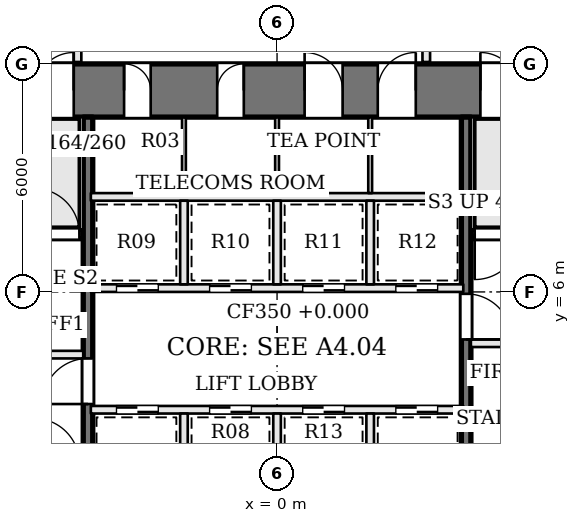
"""IFC4 building model, lengths in metres.
Left out: names, types, materials, properties, quantities, classifications, styles, units other than length and angle.
Written with IfcOpenShell. Run it as: python <this file> out.ifc"""

import sys

from ifc_helpers import new_model, si_unit, direction, frame, frame_2d, origin, place, context, subcontext, project, spatial, rectangle, extrude, element, fill, save


model = new_model("IFC4")
c1 = context("Model", 3, precision=1e-05, world=origin(), true_north=direction((0.0, 1.0)))
c2 = subcontext(c1, "Body", "Model", "MODEL_VIEW")
j1 = project(units=[si_unit("LENGTHUNIT", "METRE"), si_unit("PLANEANGLEUNIT", "RADIAN")], contexts=[c1])
p1 = place(None, origin())
s1 = spatial("IfcSite", under=j1, at=p1, CompositionType="ELEMENT")
p2 = place(p1, origin())
s2 = spatial("IfcBuilding", under=s1, at=p2, CompositionType="ELEMENT")
p3 = place(p2, origin())
s3 = spatial("IfcBuildingStorey", under=s2, at=p3, CompositionType="ELEMENT", Elevation=0.0)
p4 = place(p3, frame((-13.0, 11.3, 0.0), z_axis=(0.0, 0.0, 1.0), x_axis=(1.0, 0.0, 0.0)))
e1 = element("IfcWall", 1, at=p4, inside=s3, PredefinedType="SHEAR", context=c2, shape_type="SweptSolid", body=[
    extrude(rectangle(XDim=26.0, YDim=1.4, at=frame_2d((13.0, 0.0))), origin(), (0.0, 0.0, 1.0), 7.2),
])
p5 = place(p4, frame((8.975, 0.0, 0.0)))
e2 = element("IfcOpeningElement", 2, at=p5, cuts=e1, PredefinedType="OPENING", context=c2, shape_type="SweptSolid", body=[
    extrude(rectangle(XDim=0.7, YDim=2.1, at=frame_2d((0.35, 1.05))), frame((0.0, 0.71, 0.0), z_axis=(0.0, -1.0, 0.0), x_axis=(1.0, 0.0, 0.0)), (0.0, 0.0, 1.0), 1.42),
])
p6 = place(p4, frame((11.425, 0.0, 0.0)))
e3 = element("IfcOpeningElement", 3, at=p6, cuts=e1, PredefinedType="OPENING", context=c2, shape_type="SweptSolid", body=[
    extrude(rectangle(XDim=0.7, YDim=2.1, at=frame_2d((0.35, 1.05))), frame((0.0, 0.71, 0.0), z_axis=(0.0, -1.0, 0.0), x_axis=(1.0, 0.0, 0.0)), (0.0, 0.0, 1.0), 1.42),
])
p7 = place(p4, frame((13.725, 0.0, 0.0)))
e4 = element("IfcOpeningElement", 4, at=p7, cuts=e1, PredefinedType="OPENING", context=c2, shape_type="SweptSolid", body=[
    extrude(rectangle(XDim=1.0, YDim=2.1, at=frame_2d((0.5, 1.05))), frame((0.0, 0.71, 0.0), z_axis=(0.0, -1.0, 0.0), x_axis=(1.0, 0.0, 0.0)), (0.0, 0.0, 1.0), 1.42),
])
p8 = place(p4, frame((15.65, 0.0, 0.0)))
e5 = element("IfcOpeningElement", 5, at=p8, cuts=e1, PredefinedType="OPENING", context=c2, shape_type="SweptSolid", body=[
    extrude(rectangle(XDim=1.0, YDim=2.1, at=frame_2d((0.5, 1.05))), frame((0.0, 0.71, 0.0), z_axis=(0.0, -1.0, 0.0), x_axis=(1.0, 0.0, 0.0)), (0.0, 0.0, 1.0), 1.42),
])
p9 = place(p4, frame((6.65, 0.0, 0.0)))
e6 = element("IfcOpeningElement", 6, at=p9, cuts=e1, PredefinedType="OPENING", context=c2, shape_type="SweptSolid", body=[
    extrude(rectangle(XDim=1.0, YDim=2.1, at=frame_2d((0.5, 1.05))), frame((0.0, 0.71, 0.0), z_axis=(0.0, -1.0, 0.0), x_axis=(1.0, 0.0, 0.0)), (0.0, 0.0, 1.0), 1.42),
])
p10 = place(p4, frame((18.35, 0.0, 0.0)))
e7 = element("IfcOpeningElement", 7, at=p10, cuts=e1, PredefinedType="OPENING", context=c2, shape_type="SweptSolid", body=[
    extrude(rectangle(XDim=1.0, YDim=2.1, at=frame_2d((0.5, 1.05))), frame((0.0, 0.71, 0.0), z_axis=(0.0, -1.0, 0.0), x_axis=(1.0, 0.0, 0.0)), (0.0, 0.0, 1.0), 1.42),
])
p11 = place(p3, frame((11.6, 7.525, 0.0), z_axis=(0.0, 0.0, 1.0), x_axis=(-1.0, 0.0, 0.0)))
e8 = element("IfcWall", 8, at=p11, inside=s3, PredefinedType="SOLIDWALL", context=c2, shape_type="SweptSolid", body=[
    extrude(rectangle(XDim=6.5, YDim=0.25, at=frame_2d((3.25, 0.0))), origin(), (0.0, 0.0, 1.0), 6.95),
])
p12 = place(p11, frame((5.2, 0.0, 0.0)))
e9 = element("IfcOpeningElement", 9, at=p12, cuts=e8, PredefinedType="OPENING", context=c2, shape_type="SweptSolid", body=[
    extrude(rectangle(XDim=1.2, YDim=2.1, at=frame_2d((0.6, 1.05))), frame((0.0, 0.135, 0.0), z_axis=(0.0, -1.0, 0.0), x_axis=(1.0, 0.0, 0.0)), (0.0, 0.0, 1.0), 0.27),
])
p13 = place(p3, frame((-11.6, 4.35, 0.0), z_axis=(0.0, 0.0, 1.0), x_axis=(1.0, 0.0, 0.0)))
e10 = element("IfcWall", 10, at=p13, inside=s3, PredefinedType="SOLIDWALL", context=c2, shape_type="SweptSolid", body=[
    extrude(rectangle(XDim=6.5, YDim=0.2, at=frame_2d((3.25, 0.0))), origin(), (0.0, 0.0, 1.0), 6.95),
])
p14 = place(p13, frame((3.8, 0.0, 0.0)))
e11 = element("IfcOpeningElement", 11, at=p14, cuts=e10, PredefinedType="OPENING", context=c2, shape_type="SweptSolid", body=[
    extrude(rectangle(XDim=1.2, YDim=2.1, at=frame_2d((0.6, 1.05))), frame((0.0, 0.11, 0.0), z_axis=(0.0, -1.0, 0.0), x_axis=(1.0, 0.0, 0.0)), (0.0, 0.0, 1.0), 0.22),
])
p15 = place(p13, frame((0.5, 0.0, 0.0)))
e12 = element("IfcOpeningElement", 12, at=p15, cuts=e10, PredefinedType="OPENING", context=c2, shape_type="SweptSolid", body=[
    extrude(rectangle(XDim=1.2, YDim=2.1, at=frame_2d((0.6, 1.05))), frame((0.0, 0.11, 0.0), z_axis=(0.0, -1.0, 0.0), x_axis=(1.0, 0.0, 0.0)), (0.0, 0.0, 1.0), 0.22),
])
p16 = place(p3, frame((11.6, 4.65, 0.0), z_axis=(0.0, 0.0, 1.0), x_axis=(-1.0, 0.0, 0.0)))
e13 = element("IfcWall", 13, at=p16, inside=s3, PredefinedType="SOLIDWALL", context=c2, shape_type="SweptSolid", body=[
    extrude(rectangle(XDim=6.5, YDim=0.2, at=frame_2d((3.25, 0.0))), origin(), (0.0, 0.0, 1.0), 6.95),
])
p17 = place(p16, frame((3.8, 0.0, 0.0)))
e14 = element("IfcOpeningElement", 14, at=p17, cuts=e13, PredefinedType="OPENING", context=c2, shape_type="SweptSolid", body=[
    extrude(rectangle(XDim=1.2, YDim=2.1, at=frame_2d((0.6, 1.05))), frame((0.0, 0.11, 0.0), z_axis=(0.0, -1.0, 0.0), x_axis=(1.0, 0.0, 0.0)), (0.0, 0.0, 1.0), 0.22),
])
p18 = place(p16, frame((0.5, 0.0, 0.0)))
e15 = element("IfcOpeningElement", 15, at=p18, cuts=e13, PredefinedType="OPENING", context=c2, shape_type="SweptSolid", body=[
    extrude(rectangle(XDim=1.2, YDim=2.1, at=frame_2d((0.6, 1.05))), frame((0.0, 0.11, 0.0), z_axis=(0.0, -1.0, 0.0), x_axis=(1.0, 0.0, 0.0)), (0.0, 0.0, 1.0), 0.22),
])
p19 = place(p3, frame((-11.6, 7.525, 0.0), z_axis=(0.0, 0.0, 1.0), x_axis=(1.0, 0.0, 0.0)))
e16 = element("IfcWall", 16, at=p19, inside=s3, PredefinedType="SOLIDWALL", context=c2, shape_type="SweptSolid", body=[
    extrude(rectangle(XDim=6.5, YDim=0.25, at=frame_2d((3.25, 0.0))), origin(), (0.0, 0.0, 1.0), 6.95),
])
p20 = place(p19, frame((5.2, 0.0, 0.0)))
e17 = element("IfcOpeningElement", 17, at=p20, cuts=e16, PredefinedType="OPENING", context=c2, shape_type="SweptSolid", body=[
    extrude(rectangle(XDim=1.2, YDim=2.1, at=frame_2d((0.6, 1.05))), frame((0.0, 0.135, 0.0), z_axis=(0.0, -1.0, 0.0), x_axis=(1.0, 0.0, 0.0)), (0.0, 0.0, 1.0), 0.27),
])
p21 = place(p3, frame((-4.975, -1.6, 0.0), z_axis=(0.0, 0.0, 1.0), x_axis=(0.0, 1.0, 0.0)))
e18 = element("IfcWall", 18, at=p21, inside=s3, PredefinedType="SOLIDWALL", context=c2, shape_type="SweptSolid", body=[
    extrude(rectangle(XDim=12.2, YDim=0.25, at=frame_2d((6.1, 0.0))), origin(), (0.0, 0.0, 1.0), 6.95),
])
p22 = place(p21, frame((4.65, 0.0, 0.0)))
e19 = element("IfcOpeningElement", 19, at=p22, cuts=e18, PredefinedType="OPENING", context=c2, shape_type="SweptSolid", body=[
    extrude(rectangle(XDim=1.2, YDim=2.1, at=frame_2d((0.6, 1.05))), frame((0.0, 0.135, 0.0), z_axis=(0.0, -1.0, 0.0), x_axis=(1.0, 0.0, 0.0)), (0.0, 0.0, 1.0), 0.27),
])
p23 = place(p3, frame((4.975, 10.6, 0.0), z_axis=(0.0, 0.0, 1.0), x_axis=(0.0, -1.0, 0.0)))
e20 = element("IfcWall", 20, at=p23, inside=s3, PredefinedType="SOLIDWALL", context=c2, shape_type="SweptSolid", body=[
    extrude(rectangle(XDim=12.2, YDim=0.25, at=frame_2d((6.1, 0.0))), origin(), (0.0, 0.0, 1.0), 6.95),
])
p24 = place(p23, frame((4.65, 0.0, 0.0)))
e21 = element("IfcOpeningElement", 21, at=p24, cuts=e20, PredefinedType="OPENING", context=c2, shape_type="SweptSolid", body=[
    extrude(rectangle(XDim=1.2, YDim=2.1, at=frame_2d((0.6, 1.05))), frame((0.0, 0.135, 0.0), z_axis=(0.0, -1.0, 0.0), x_axis=(1.0, 0.0, 0.0)), (0.0, 0.0, 1.0), 0.27),
])
p25 = place(p3, frame((-4.9, 2.9, 0.0), z_axis=(0.0, 0.0, 1.0), x_axis=(1.0, 0.0, 0.0)))
e22 = element("IfcWall", 22, at=p25, inside=s3, PredefinedType="SOLIDWALL", context=c2, shape_type="SweptSolid", body=[
    extrude(rectangle(XDim=9.8, YDim=0.2, at=frame_2d((4.9, 0.0))), origin(), (0.0, 0.0, 1.0), 6.95),
])
p26 = place(p25, frame((0.675, 0.0, 0.0)))
e23 = element("IfcOpeningElement", 23, at=p26, cuts=e22, PredefinedType="OPENING", context=c2, shape_type="SweptSolid", body=[
    extrude(rectangle(XDim=1.1, YDim=2.1, at=frame_2d((0.55, 1.05))), frame((0.0, 0.11, 0.0), z_axis=(0.0, -1.0, 0.0), x_axis=(1.0, 0.0, 0.0)), (0.0, 0.0, 1.0), 0.22),
])
p27 = place(p25, frame((3.125, 0.0, 0.0)))
e24 = element("IfcOpeningElement", 24, at=p27, cuts=e22, PredefinedType="OPENING", context=c2, shape_type="SweptSolid", body=[
    extrude(rectangle(XDim=1.1, YDim=2.1, at=frame_2d((0.55, 1.05))), frame((0.0, 0.11, 0.0), z_axis=(0.0, -1.0, 0.0), x_axis=(1.0, 0.0, 0.0)), (0.0, 0.0, 1.0), 0.22),
])
p28 = place(p25, frame((5.575, 0.0, 0.0)))
e25 = element("IfcOpeningElement", 25, at=p28, cuts=e22, PredefinedType="OPENING", context=c2, shape_type="SweptSolid", body=[
    extrude(rectangle(XDim=1.1, YDim=2.1, at=frame_2d((0.55, 1.05))), frame((0.0, 0.11, 0.0), z_axis=(0.0, -1.0, 0.0), x_axis=(1.0, 0.0, 0.0)), (0.0, 0.0, 1.0), 0.22),
])
p29 = place(p25, frame((8.025, 0.0, 0.0)))
e26 = element("IfcOpeningElement", 26, at=p29, cuts=e22, PredefinedType="OPENING", context=c2, shape_type="SweptSolid", body=[
    extrude(rectangle(XDim=1.1, YDim=2.1, at=frame_2d((0.55, 1.05))), frame((0.0, 0.11, 0.0), z_axis=(0.0, -1.0, 0.0), x_axis=(1.0, 0.0, 0.0)), (0.0, 0.0, 1.0), 0.22),
])
p30 = place(p3, frame((-4.9, 6.1, 0.0), z_axis=(0.0, 0.0, 1.0), x_axis=(1.0, 0.0, 0.0)))
e27 = element("IfcWall", 27, at=p30, inside=s3, PredefinedType="SOLIDWALL", context=c2, shape_type="SweptSolid", body=[
    extrude(rectangle(XDim=9.8, YDim=0.2, at=frame_2d((4.9, 0.0))), origin(), (0.0, 0.0, 1.0), 6.95),
])
p31 = place(p30, frame((0.675, 0.0, 0.0)))
e28 = element("IfcOpeningElement", 28, at=p31, cuts=e27, PredefinedType="OPENING", context=c2, shape_type="SweptSolid", body=[
    extrude(rectangle(XDim=1.1, YDim=2.1, at=frame_2d((0.55, 1.05))), frame((0.0, 0.11, 0.0), z_axis=(0.0, -1.0, 0.0), x_axis=(1.0, 0.0, 0.0)), (0.0, 0.0, 1.0), 0.22),
])
p32 = place(p30, frame((3.125, 0.0, 0.0)))
e29 = element("IfcOpeningElement", 29, at=p32, cuts=e27, PredefinedType="OPENING", context=c2, shape_type="SweptSolid", body=[
    extrude(rectangle(XDim=1.1, YDim=2.1, at=frame_2d((0.55, 1.05))), frame((0.0, 0.11, 0.0), z_axis=(0.0, -1.0, 0.0), x_axis=(1.0, 0.0, 0.0)), (0.0, 0.0, 1.0), 0.22),
])
p33 = place(p30, frame((5.575, 0.0, 0.0)))
e30 = element("IfcOpeningElement", 30, at=p33, cuts=e27, PredefinedType="OPENING", context=c2, shape_type="SweptSolid", body=[
    extrude(rectangle(XDim=1.1, YDim=2.1, at=frame_2d((0.55, 1.05))), frame((0.0, 0.11, 0.0), z_axis=(0.0, -1.0, 0.0), x_axis=(1.0, 0.0, 0.0)), (0.0, 0.0, 1.0), 0.22),
])
p34 = place(p30, frame((8.025, 0.0, 0.0)))
e31 = element("IfcOpeningElement", 31, at=p34, cuts=e27, PredefinedType="OPENING", context=c2, shape_type="SweptSolid", body=[
    extrude(rectangle(XDim=1.1, YDim=2.1, at=frame_2d((0.55, 1.05))), frame((0.0, 0.11, 0.0), z_axis=(0.0, -1.0, 0.0), x_axis=(1.0, 0.0, 0.0)), (0.0, 0.0, 1.0), 0.22),
])
p35 = place(p3, frame((-4.9, 8.5, 0.0), z_axis=(0.0, 0.0, 1.0), x_axis=(1.0, 0.0, 0.0)))
e32 = element("IfcWall", 32, at=p35, inside=s3, PredefinedType="SOLIDWALL", context=c2, shape_type="SweptSolid", body=[
    extrude(rectangle(XDim=9.8, YDim=0.2, at=frame_2d((4.9, 0.0))), origin(), (0.0, 0.0, 1.0), 6.95),
])
for number, where, z_axis, x_axis in (
    (33, (-2.45, 0.6, 0.0), (0.0, 0.0, 1.0), (0.0, 1.0, 0.0)),
    (34, (0.0, 0.6, 0.0), (0.0, 0.0, 1.0), (0.0, 1.0, 0.0)),
    (35, (2.45, 0.6, 0.0), (0.0, 0.0, 1.0), (0.0, 1.0, 0.0)),
    (36, (-2.45, 6.2, 0.0), (0.0, 0.0, 1.0), (0.0, 1.0, 0.0)),
    (37, (0.0, 6.2, 0.0), (0.0, 0.0, 1.0), (0.0, 1.0, 0.0)),
    (38, (2.45, 6.2, 0.0), (0.0, 0.0, 1.0), (0.0, 1.0, 0.0)),
):
    element("IfcWall", number, at=place(p3, frame(where, z_axis=z_axis, x_axis=x_axis)), inside=s3, PredefinedType="SOLIDWALL", context=c2, shape_type="SweptSolid", body=[
        extrude(rectangle(XDim=2.2, YDim=0.2, at=frame_2d((1.1, 0.0))), origin(), (0.0, 0.0, 1.0), 6.95),
    ])
for number, where, z_axis, x_axis in (
    (39, (-2.45, 8.6, 0.0), (0.0, 0.0, 1.0), (0.0, 1.0, 0.0)),
    (40, (0.0, 8.6, 0.0), (0.0, 0.0, 1.0), (0.0, 1.0, 0.0)),
    (41, (2.45, 8.6, 0.0), (0.0, 0.0, 1.0), (0.0, 1.0, 0.0)),
):
    element("IfcWall", number, at=place(p3, frame(where, z_axis=z_axis, x_axis=x_axis)), inside=s3, PredefinedType="PARTITIONING", context=c2, shape_type="SweptSolid", body=[
        extrude(rectangle(XDim=2.0, YDim=0.1, at=frame_2d((1.0, 0.0))), origin(), (0.0, 0.0, 1.0), 6.95),
    ])
p36 = place(p3, frame((-5.25, 22.21, 0.0), z_axis=(0.0, 0.0, 1.0), x_axis=(0.0, -1.0, 0.0)))
e42 = element("IfcWall", 42, at=p36, inside=s3, PredefinedType="PARTITIONING", context=c2, shape_type="SweptSolid", body=[
    extrude(rectangle(XDim=10.16, YDim=0.2, at=frame_2d((5.08, 0.0))), origin(), (0.0, 0.0, 1.0), 6.23),
])
p37 = place(p36, frame((8.21, 0.0, 0.0)))
e43 = element("IfcOpeningElement", 43, at=p37, cuts=e42, PredefinedType="OPENING", context=c2, shape_type="SweptSolid", body=[
    extrude(rectangle(XDim=1.0, YDim=2.1, at=frame_2d((0.5, 1.05))), frame((0.0, 0.11, 0.0), z_axis=(0.0, -1.0, 0.0), x_axis=(1.0, 0.0, 0.0)), (0.0, 0.0, 1.0), 0.22),
])
p38 = place(p3, frame((3.926, 12.05, 0.0), z_axis=(0.0, 0.0, 1.0), x_axis=(0.0, 1.0, 0.0)))
e44 = element("IfcWall", 44, at=p38, inside=s3, PredefinedType="PARTITIONING", context=c2, shape_type="SweptSolid", body=[
    extrude(rectangle(XDim=10.252, YDim=0.2, at=frame_2d((5.126, 0.0))), origin(), (0.0, 0.0, 1.0), 6.23),
])
p39 = place(p38, frame((0.95, 0.0, 0.0)))
e45 = element("IfcOpeningElement", 45, at=p39, cuts=e44, PredefinedType="OPENING", context=c2, shape_type="SweptSolid", body=[
    extrude(rectangle(XDim=1.0, YDim=2.1, at=frame_2d((0.5, 1.05))), frame((0.0, 0.11, 0.0), z_axis=(0.0, -1.0, 0.0), x_axis=(1.0, 0.0, 0.0)), (0.0, 0.0, 1.0), 0.22),
])
p40 = place(p22, origin())
e46 = element("IfcDoor", 46, at=p40, inside=s3, OperationType="SINGLE_SWING_LEFT", PredefinedType="DOOR", context=c2, shape_type="SweptSolid", body=[
    extrude(rectangle(XDim=1.2, YDim=2.1, at=frame_2d((0.6, 1.05))), frame((0.0, 0.025, 0.0), z_axis=(0.0, -1.0, 0.0), x_axis=(1.0, 0.0, 0.0)), (0.0, 0.0, 1.0), 0.05),
])
fill(e19, e46)
p41 = place(p24, origin())
e47 = element("IfcDoor", 47, at=p41, inside=s3, OperationType="SINGLE_SWING_RIGHT", PredefinedType="DOOR", context=c2, shape_type="SweptSolid", body=[
    extrude(rectangle(XDim=1.2, YDim=2.1, at=frame_2d((0.6, 1.05))), frame((0.0, 0.025, 0.0), z_axis=(0.0, -1.0, 0.0), x_axis=(1.0, 0.0, 0.0)), (0.0, 0.0, 1.0), 0.05),
])
fill(e21, e47)
p42 = place(p12, origin())
e48 = element("IfcDoor", 48, at=p42, inside=s3, OperationType="SINGLE_SWING_RIGHT", PredefinedType="DOOR", context=c2, shape_type="SweptSolid", body=[
    extrude(rectangle(XDim=1.2, YDim=2.1, at=frame_2d((0.6, 1.05))), frame((0.0, 0.025, 0.0), z_axis=(0.0, -1.0, 0.0), x_axis=(1.0, 0.0, 0.0)), (0.0, 0.0, 1.0), 0.05),
])
fill(e9, e48)
p43 = place(p20, origin())
e49 = element("IfcDoor", 49, at=p43, inside=s3, OperationType="SINGLE_SWING_LEFT", PredefinedType="DOOR", context=c2, shape_type="SweptSolid", body=[
    extrude(rectangle(XDim=1.2, YDim=2.1, at=frame_2d((0.6, 1.05))), frame((0.0, 0.025, 0.0), z_axis=(0.0, -1.0, 0.0), x_axis=(1.0, 0.0, 0.0)), (0.0, 0.0, 1.0), 0.05),
])
fill(e17, e49)
p44 = place(p26, origin())
e50 = element("IfcDoor", 50, at=p44, inside=s3, OperationType="SLIDING_TO_RIGHT", PredefinedType="DOOR", context=c2, shape_type="SweptSolid", body=[
    extrude(rectangle(XDim=1.1, YDim=2.1, at=frame_2d((0.55, 1.05))), frame((0.0, 0.025, 0.0), z_axis=(0.0, -1.0, 0.0), x_axis=(1.0, 0.0, 0.0)), (0.0, 0.0, 1.0), 0.05),
])
fill(e23, e50)
p45 = place(p27, origin())
e51 = element("IfcDoor", 51, at=p45, inside=s3, OperationType="SLIDING_TO_LEFT", PredefinedType="DOOR", context=c2, shape_type="SweptSolid", body=[
    extrude(rectangle(XDim=1.1, YDim=2.1, at=frame_2d((0.55, 1.05))), frame((0.0, 0.025, 0.0), z_axis=(0.0, -1.0, 0.0), x_axis=(1.0, 0.0, 0.0)), (0.0, 0.0, 1.0), 0.05),
])
fill(e24, e51)
p46 = place(p28, origin())
e52 = element("IfcDoor", 52, at=p46, inside=s3, OperationType="SLIDING_TO_LEFT", PredefinedType="DOOR", context=c2, shape_type="SweptSolid", body=[
    extrude(rectangle(XDim=1.1, YDim=2.1, at=frame_2d((0.55, 1.05))), frame((0.0, 0.025, 0.0), z_axis=(0.0, -1.0, 0.0), x_axis=(1.0, 0.0, 0.0)), (0.0, 0.0, 1.0), 0.05),
])
fill(e25, e52)
p47 = place(p29, origin())
e53 = element("IfcDoor", 53, at=p47, inside=s3, OperationType="SLIDING_TO_RIGHT", PredefinedType="DOOR", context=c2, shape_type="SweptSolid", body=[
    extrude(rectangle(XDim=1.1, YDim=2.1, at=frame_2d((0.55, 1.05))), frame((0.0, 0.025, 0.0), z_axis=(0.0, -1.0, 0.0), x_axis=(1.0, 0.0, 0.0)), (0.0, 0.0, 1.0), 0.05),
])
fill(e26, e53)
p48 = place(p31, origin())
e54 = element("IfcDoor", 54, at=p48, inside=s3, OperationType="SLIDING_TO_RIGHT", PredefinedType="DOOR", context=c2, shape_type="SweptSolid", body=[
    extrude(rectangle(XDim=1.1, YDim=2.1, at=frame_2d((0.55, 1.05))), frame((0.0, 0.025, 0.0), z_axis=(0.0, -1.0, 0.0), x_axis=(1.0, 0.0, 0.0)), (0.0, 0.0, 1.0), 0.05),
])
fill(e28, e54)
p49 = place(p32, origin())
e55 = element("IfcDoor", 55, at=p49, inside=s3, OperationType="SLIDING_TO_LEFT", PredefinedType="DOOR", context=c2, shape_type="SweptSolid", body=[
    extrude(rectangle(XDim=1.1, YDim=2.1, at=frame_2d((0.55, 1.05))), frame((0.0, 0.025, 0.0), z_axis=(0.0, -1.0, 0.0), x_axis=(1.0, 0.0, 0.0)), (0.0, 0.0, 1.0), 0.05),
])
fill(e29, e55)
p50 = place(p33, origin())
e56 = element("IfcDoor", 56, at=p50, inside=s3, OperationType="SLIDING_TO_RIGHT", PredefinedType="DOOR", context=c2, shape_type="SweptSolid", body=[
    extrude(rectangle(XDim=1.1, YDim=2.1, at=frame_2d((0.55, 1.05))), frame((0.0, 0.025, 0.0), z_axis=(0.0, -1.0, 0.0), x_axis=(1.0, 0.0, 0.0)), (0.0, 0.0, 1.0), 0.05),
])
fill(e30, e56)
p51 = place(p34, origin())
e57 = element("IfcDoor", 57, at=p51, inside=s3, OperationType="SLIDING_TO_LEFT", PredefinedType="DOOR", context=c2, shape_type="SweptSolid", body=[
    extrude(rectangle(XDim=1.1, YDim=2.1, at=frame_2d((0.55, 1.05))), frame((0.0, 0.025, 0.0), z_axis=(0.0, -1.0, 0.0), x_axis=(1.0, 0.0, 0.0)), (0.0, 0.0, 1.0), 0.05),
])
fill(e31, e57)
p52 = place(p5, origin())
e58 = element("IfcDoor", 58, at=p52, inside=s3, OperationType="SINGLE_SWING_LEFT", PredefinedType="DOOR", context=c2, shape_type="SweptSolid", body=[
    extrude(rectangle(XDim=0.7, YDim=2.1, at=frame_2d((0.35, 1.05))), frame((0.0, 0.025, 0.0), z_axis=(0.0, -1.0, 0.0), x_axis=(1.0, 0.0, 0.0)), (0.0, 0.0, 1.0), 0.05),
])
fill(e2, e58)
p53 = place(p6, origin())
e59 = element("IfcDoor", 59, at=p53, inside=s3, OperationType="SINGLE_SWING_RIGHT", PredefinedType="DOOR", context=c2, shape_type="SweptSolid", body=[
    extrude(rectangle(XDim=0.7, YDim=2.1, at=frame_2d((0.35, 1.05))), frame((0.0, 0.025, 0.0), z_axis=(0.0, -1.0, 0.0), x_axis=(1.0, 0.0, 0.0)), (0.0, 0.0, 1.0), 0.05),
])
fill(e3, e59)
p54 = place(p7, origin())
e60 = element("IfcDoor", 60, at=p54, inside=s3, OperationType="SINGLE_SWING_LEFT", PredefinedType="DOOR", context=c2, shape_type="SweptSolid", body=[
    extrude(rectangle(XDim=1.0, YDim=2.1, at=frame_2d((0.5, 1.05))), frame((0.0, 0.025, 0.0), z_axis=(0.0, -1.0, 0.0), x_axis=(1.0, 0.0, 0.0)), (0.0, 0.0, 1.0), 0.05),
])
fill(e4, e60)
p55 = place(p8, origin())
e61 = element("IfcDoor", 61, at=p55, inside=s3, OperationType="SINGLE_SWING_RIGHT", PredefinedType="DOOR", context=c2, shape_type="SweptSolid", body=[
    extrude(rectangle(XDim=1.0, YDim=2.1, at=frame_2d((0.5, 1.05))), frame((0.0, 0.025, 0.0), z_axis=(0.0, -1.0, 0.0), x_axis=(1.0, 0.0, 0.0)), (0.0, 0.0, 1.0), 0.05),
])
fill(e5, e61)
p56 = place(p9, origin())
e62 = element("IfcDoor", 62, at=p56, inside=s3, OperationType="SINGLE_SWING_RIGHT", PredefinedType="DOOR", context=c2, shape_type="SweptSolid", body=[
    extrude(rectangle(XDim=1.0, YDim=2.1, at=frame_2d((0.5, 1.05))), frame((0.0, 0.025, 0.0), z_axis=(0.0, -1.0, 0.0), x_axis=(1.0, 0.0, 0.0)), (0.0, 0.0, 1.0), 0.05),
])
fill(e6, e62)
p57 = place(p10, origin())
e63 = element("IfcDoor", 63, at=p57, inside=s3, OperationType="SINGLE_SWING_LEFT", PredefinedType="DOOR", context=c2, shape_type="SweptSolid", body=[
    extrude(rectangle(XDim=1.0, YDim=2.1, at=frame_2d((0.5, 1.05))), frame((0.0, 0.025, 0.0), z_axis=(0.0, -1.0, 0.0), x_axis=(1.0, 0.0, 0.0)), (0.0, 0.0, 1.0), 0.05),
])
fill(e7, e63)
save(model, sys.argv[1])
